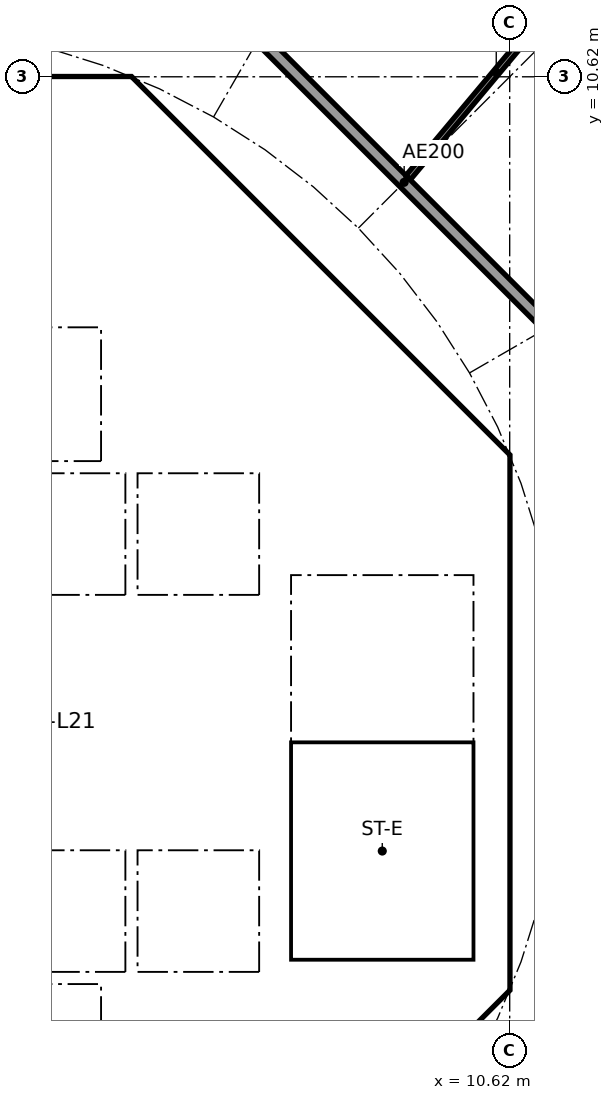
"""IFC4 building model, lengths in metres.
Left out: names, types, materials, properties, quantities, classifications, styles, units other than length and angle.
Written with IfcOpenShell. Run it as: python <this file> out.ifc"""

import sys

from ifc_helpers import new_model, si_unit, direction, frame, frame_2d, origin, place, context, subcontext, project, spatial, polyline, rectangle, outline, extrude, element, fill, save


model = new_model("IFC4")
c1 = context("Model", 3, precision=1e-05, world=origin(), true_north=direction((0.0, 1.0)))
c2 = subcontext(c1, "Body", "Model", "MODEL_VIEW")
j1 = project(units=[si_unit("LENGTHUNIT", "METRE"), si_unit("PLANEANGLEUNIT", "RADIAN")], contexts=[c1])
p1 = place(None, origin())
s1 = spatial("IfcSite", under=j1, at=p1, CompositionType="ELEMENT")
p2 = place(p1, origin())
s2 = spatial("IfcBuilding", under=s1, at=p2, CompositionType="ELEMENT")
p3 = place(p2, frame((0.0, 0.0, 84.4)))
s3 = spatial("IfcBuildingStorey", under=s2, at=p3, CompositionType="ELEMENT", Elevation=84.4)
p4 = place(p3, frame((9.988, 4.613, 0.0), z_axis=(0.0, 0.0, 1.0), x_axis=(-0.707106781187, 0.707106781187, 0.0)))
e1 = element("IfcWall", 1, at=p4, inside=s3, PredefinedType="SHEAR", context=c2, shape_type="SweptSolid", body=[
    extrude(rectangle(XDim=7.602, YDim=0.6, at=frame_2d((3.801, 0.0))), origin(), (0.0, 0.0, 1.0), 3.44),
])
p5 = place(p4, frame((3.201, 0.0, 0.0)))
e2 = element("IfcOpeningElement", 2, at=p5, cuts=e1, PredefinedType="OPENING", context=c2, shape_type="SweptSolid", body=[
    extrude(rectangle(XDim=1.2, YDim=2.1, at=frame_2d((0.6, 1.05))), frame((0.0, 0.31, 0.0), z_axis=(0.0, -1.0, 0.0), x_axis=(1.0, 0.0, 0.0)), (0.0, 0.0, 1.0), 0.62),
])
p6 = place(p3, frame((4.613, -9.988, 0.0), z_axis=(0.0, 0.0, 1.0), x_axis=(0.707106781187, 0.707106781187, 0.0)))
e3 = element("IfcWall", 3, at=p6, inside=s3, PredefinedType="SHEAR", context=c2, shape_type="SweptSolid", body=[
    extrude(rectangle(XDim=7.602, YDim=0.6, at=frame_2d((3.801, 0.0))), origin(), (0.0, 0.0, 1.0), 3.44),
])
p7 = place(p6, frame((3.201, 0.0, 0.0)))
e4 = element("IfcOpeningElement", 4, at=p7, cuts=e3, PredefinedType="OPENING", context=c2, shape_type="SweptSolid", body=[
    extrude(rectangle(XDim=1.2, YDim=2.1, at=frame_2d((0.6, 1.05))), frame((0.0, 0.31, 0.0), z_axis=(0.0, -1.0, 0.0), x_axis=(1.0, 0.0, 0.0)), (0.0, 0.0, 1.0), 0.62),
])
p8 = place(p3, frame((4.0, 4.3, 0.0), z_axis=(0.0, 0.0, 1.0), x_axis=(0.0, 1.0, 0.0)))
e5 = element("IfcWall", 5, at=p8, inside=s3, PredefinedType="SOLIDWALL", context=c2, shape_type="SweptSolid", body=[
    extrude(rectangle(XDim=2.2, YDim=0.2, at=frame_2d((1.1, 0.0))), origin(), (0.0, 0.0, 1.0), 3.44),
])
p9 = place(p8, frame((0.55, 0.0, 0.0)))
e6 = element("IfcOpeningElement", 6, at=p9, cuts=e5, PredefinedType="OPENING", context=c2, shape_type="SweptSolid", body=[
    extrude(rectangle(XDim=1.1, YDim=2.1, at=frame_2d((0.55, 1.05))), frame((0.0, 0.11, 0.0), z_axis=(0.0, -1.0, 0.0), x_axis=(1.0, 0.0, 0.0)), (0.0, 0.0, 1.0), 0.22),
])
p10 = place(p3, frame((-6.7, 2.0, 0.0), z_axis=(0.0, 0.0, 1.0), x_axis=(1.0, 0.0, 0.0)))
e7 = element("IfcWall", 7, at=p10, inside=s3, PredefinedType="SOLIDWALL", context=c2, shape_type="SweptSolid", body=[
    extrude(rectangle(XDim=13.4, YDim=0.2, at=frame_2d((6.7, 0.0))), origin(), (0.0, 0.0, 1.0), 3.44),
])
p11 = place(p10, frame((0.65, 0.0, 0.0)))
e8 = element("IfcOpeningElement", 8, at=p11, cuts=e7, PredefinedType="OPENING", context=c2, shape_type="SweptSolid", body=[
    extrude(rectangle(XDim=1.1, YDim=2.1, at=frame_2d((0.55, 1.05))), frame((0.0, 0.11, 0.0), z_axis=(0.0, -1.0, 0.0), x_axis=(1.0, 0.0, 0.0)), (0.0, 0.0, 1.0), 0.22),
])
p12 = place(p10, frame((2.85, 0.0, 0.0)))
e9 = element("IfcOpeningElement", 9, at=p12, cuts=e7, PredefinedType="OPENING", context=c2, shape_type="SweptSolid", body=[
    extrude(rectangle(XDim=1.1, YDim=2.1, at=frame_2d((0.55, 1.05))), frame((0.0, 0.11, 0.0), z_axis=(0.0, -1.0, 0.0), x_axis=(1.0, 0.0, 0.0)), (0.0, 0.0, 1.0), 0.22),
])
p13 = place(p10, frame((5.05, 0.0, 0.0)))
e10 = element("IfcOpeningElement", 10, at=p13, cuts=e7, PredefinedType="OPENING", context=c2, shape_type="SweptSolid", body=[
    extrude(rectangle(XDim=1.1, YDim=2.1, at=frame_2d((0.55, 1.05))), frame((0.0, 0.11, 0.0), z_axis=(0.0, -1.0, 0.0), x_axis=(1.0, 0.0, 0.0)), (0.0, 0.0, 1.0), 0.22),
])
p14 = place(p3, frame((6.7, 4.0, 0.0), z_axis=(0.0, 0.0, 1.0), x_axis=(1.0, 0.0, 0.0)))
e11 = element("IfcWall", 11, at=p14, inside=s3, PredefinedType="SOLIDWALL", context=c2, shape_type="SweptSolid", body=[
    extrude(rectangle(XDim=3.325, YDim=0.2, at=frame_2d((1.662, 0.0))), origin(), (0.0, 0.0, 1.0), 3.44),
])
p15 = place(p14, frame((1.25, 0.0, 0.0)))
e12 = element("IfcOpeningElement", 12, at=p15, cuts=e11, PredefinedType="OPENING", context=c2, shape_type="SweptSolid", body=[
    extrude(rectangle(XDim=1.1, YDim=2.1, at=frame_2d((0.55, 1.05))), frame((0.0, 0.11, 0.0), z_axis=(0.0, -1.0, 0.0), x_axis=(1.0, 0.0, 0.0)), (0.0, 0.0, 1.0), 0.22),
])
p16 = place(p3, frame((4.0, 7.025, 0.0), z_axis=(0.0, 0.0, 1.0), x_axis=(0.0, 1.0, 0.0)))
e13 = element("IfcWall", 13, at=p16, inside=s3, PredefinedType="SOLIDWALL", context=c2, shape_type="SweptSolid", body=[
    extrude(rectangle(XDim=3.0, YDim=0.2, at=frame_2d((1.5, 0.0))), origin(), (0.0, 0.0, 1.0), 3.44),
])
p17 = place(p16, frame((0.925, 0.0, 0.0)))
e14 = element("IfcOpeningElement", 14, at=p17, cuts=e13, PredefinedType="OPENING", context=c2, shape_type="SweptSolid", body=[
    extrude(rectangle(XDim=1.1, YDim=2.1, at=frame_2d((0.55, 1.05))), frame((0.0, 0.11, 0.0), z_axis=(0.0, -1.0, 0.0), x_axis=(1.0, 0.0, 0.0)), (0.0, 0.0, 1.0), 0.22),
])
p18 = place(p3, frame((4.0, -6.5, 0.0), z_axis=(0.0, 0.0, 1.0), x_axis=(0.0, 1.0, 0.0)))
e15 = element("IfcWall", 15, at=p18, inside=s3, PredefinedType="SOLIDWALL", context=c2, shape_type="SweptSolid", body=[
    extrude(rectangle(XDim=2.2, YDim=0.2, at=frame_2d((1.1, 0.0))), origin(), (0.0, 0.0, 1.0), 3.44),
])
p19 = place(p18, frame((0.55, 0.0, 0.0)))
e16 = element("IfcOpeningElement", 16, at=p19, cuts=e15, PredefinedType="OPENING", context=c2, shape_type="SweptSolid", body=[
    extrude(rectangle(XDim=1.1, YDim=2.1, at=frame_2d((0.55, 1.05))), frame((0.0, 0.11, 0.0), z_axis=(0.0, -1.0, 0.0), x_axis=(1.0, 0.0, 0.0)), (0.0, 0.0, 1.0), 0.22),
])
p20 = place(p3, frame((-6.7, -2.0, 0.0), z_axis=(0.0, 0.0, 1.0), x_axis=(1.0, 0.0, 0.0)))
e17 = element("IfcWall", 17, at=p20, inside=s3, PredefinedType="SOLIDWALL", context=c2, shape_type="SweptSolid", body=[
    extrude(rectangle(XDim=13.4, YDim=0.2, at=frame_2d((6.7, 0.0))), origin(), (0.0, 0.0, 1.0), 3.44),
])
p21 = place(p20, frame((0.65, 0.0, 0.0)))
e18 = element("IfcOpeningElement", 18, at=p21, cuts=e17, PredefinedType="OPENING", context=c2, shape_type="SweptSolid", body=[
    extrude(rectangle(XDim=1.1, YDim=2.1, at=frame_2d((0.55, 1.05))), frame((0.0, 0.11, 0.0), z_axis=(0.0, -1.0, 0.0), x_axis=(1.0, 0.0, 0.0)), (0.0, 0.0, 1.0), 0.22),
])
p22 = place(p20, frame((2.85, 0.0, 0.0)))
e19 = element("IfcOpeningElement", 19, at=p22, cuts=e17, PredefinedType="OPENING", context=c2, shape_type="SweptSolid", body=[
    extrude(rectangle(XDim=1.1, YDim=2.1, at=frame_2d((0.55, 1.05))), frame((0.0, 0.11, 0.0), z_axis=(0.0, -1.0, 0.0), x_axis=(1.0, 0.0, 0.0)), (0.0, 0.0, 1.0), 0.22),
])
p23 = place(p3, origin())
e20 = element("IfcWall", 20, at=p23, inside=s3, PredefinedType="SHEAR", context=c2, shape_type="SweptSolid", body=[
    extrude(outline(polyline([(-4.152, 10.025), (-4.401, 9.776), (-4.825, 10.2), (-4.401, 10.625), (4.401, 10.625), (4.825, 10.2), (4.401, 9.776), (4.152, 10.025), (-4.152, 10.025)])), origin(), (0.0, 0.0, 1.0), 3.44),
])
p24 = place(p3, origin())
e21 = element("IfcWall", 21, at=p24, inside=s3, PredefinedType="SHEAR", context=c2, shape_type="SweptSolid", body=[
    extrude(outline(polyline([(9.776, -4.401), (10.025, -4.152), (10.025, -3.801), (10.025, 4.152), (9.776, 4.401), (10.2, 4.825), (10.625, 4.401), (10.625, -4.401), (10.2, -4.825), (9.776, -4.401)])), origin(), (0.0, 0.0, 1.0), 3.44),
])
p25 = place(p3, origin())
e22 = element("IfcWall", 22, at=p25, inside=s3, PredefinedType="SOLIDWALL", context=c2, shape_type="SweptSolid", body=[
    extrude(outline(polyline([(-6.7, -2.1), (-6.5, -2.1), (-6.5, -4.1), (-4.5, -4.1), (-4.5, -2.1), (-4.3, -2.1), (-4.3, -4.1), (-2.3, -4.1), (-2.3, -2.1), (-2.1, -2.1), (-2.1, -4.1), (-0.1, -4.1), (-0.1, -2.1), (0.1, -2.1), (0.1, -4.1), (2.1, -4.1), (2.1, -2.1), (2.3, -2.1), (2.3, -4.1), (4.3, -4.1), (4.3, -2.1), (4.5, -2.1), (4.5, -4.1), (6.5, -4.1), (6.5, -2.1), (6.7, -2.1), (6.7, -4.3), (-6.7, -4.3), (-6.7, -2.1)])), origin(), (0.0, 0.0, 1.0), 3.44),
])
p26 = place(p3, origin())
e23 = element("IfcWall", 23, at=p26, inside=s3, PredefinedType="SOLIDWALL", context=c2, shape_type="SweptSolid", body=[
    extrude(outline(polyline([(-6.5, 2.1), (-6.7, 2.1), (-6.7, 4.3), (6.7, 4.3), (6.7, 2.1), (6.5, 2.1), (6.5, 4.1), (4.5, 4.1), (4.5, 2.1), (4.3, 2.1), (4.3, 4.1), (2.3, 4.1), (2.3, 2.1), (2.1, 2.1), (2.1, 4.1), (0.1, 4.1), (0.1, 2.1), (-0.1, 2.1), (-0.1, 4.1), (-2.1, 4.1), (-2.1, 2.1), (-2.3, 2.1), (-2.3, 4.1), (-4.3, 4.1), (-4.3, 2.1), (-4.5, 2.1), (-4.5, 4.1), (-6.5, 4.1), (-6.5, 2.1)])), origin(), (0.0, 0.0, 1.0), 3.44),
])
p27 = place(p3, origin())
e24 = element("IfcWall", 24, at=p27, inside=s3, PredefinedType="SOLIDWALL", context=c2, shape_type="SweptSolid", body=[
    extrude(outline(polyline([(4.1, 6.5), (-4.1, 6.5), (-4.1, 7.025), (4.1, 7.025), (4.1, 6.5)])), origin(), (0.0, 0.0, 1.0), 3.44),
])
p28 = place(p3, origin())
e25 = element("IfcWall", 25, at=p28, inside=s3, PredefinedType="SOLIDWALL", context=c2, shape_type="SweptSolid", body=[
    extrude(outline(polyline([(7.025, -3.9), (6.7, -3.9), (6.7, 3.9), (7.025, 3.9), (7.025, -3.9)])), origin(), (0.0, 0.0, 1.0), 3.44),
])
p29 = place(p3, origin())
e26 = element("IfcWall", 26, at=p29, inside=s3, PredefinedType="SOLIDWALL", context=c2, shape_type="SweptSolid", body=[
    extrude(outline(polyline([(10.025, -4.1), (6.7, -4.1), (6.7, -3.9), (10.025, -3.9), (10.025, -4.1)])), origin(), (0.0, 0.0, 1.0), 3.44),
])
p30 = place(p3, frame((12.635, 5.134, 0.0), z_axis=(0.0, 0.0, 1.0), x_axis=(-0.707106781187, 0.707106781187, 0.0)))
e27 = element("IfcWall", 27, at=p30, inside=s3, PredefinedType="PARTITIONING", context=c2, shape_type="SweptSolid", body=[
    extrude(rectangle(XDim=10.609, YDim=0.2, at=frame_2d((5.305, 0.0))), origin(), (0.0, 0.0, 1.0), 3.44),
])
p31 = place(p3, frame((13.339, 10.725, 0.0), z_axis=(0.0, 0.0, 1.0), x_axis=(-0.642515455924, 0.766272724882, 0.0)))
e28 = element("IfcWall", 28, at=p31, inside=s3, PredefinedType="PARTITIONING", context=c2, shape_type="SweptSolid", body=[
    extrude(rectangle(XDim=4.537, YDim=0.1, at=frame_2d((2.269, 0.0))), origin(), (0.0, 0.0, 1.0), 2.762),
])
p32 = place(p3, frame((8.949, 8.961, 0.0), z_axis=(0.0, 0.0, 1.0), x_axis=(0.642048217601, 0.766664259162, 0.0)))
e29 = element("IfcWall", 29, at=p32, inside=s3, PredefinedType="PARTITIONING", context=c2, shape_type="SweptSolid", body=[
    extrude(rectangle(XDim=4.518, YDim=0.1, at=frame_2d((2.259, 0.0))), origin(), (0.0, 0.0, 1.0), 2.687),
])
p33 = place(p9, origin())
e30 = element("IfcDoor", 30, at=p33, inside=s3, OperationType="DOUBLE_DOOR_SLIDING", PredefinedType="DOOR", context=c2, shape_type="SweptSolid", body=[
    extrude(rectangle(XDim=1.1, YDim=2.1, at=frame_2d((0.55, 1.05))), frame((0.0, 0.025, 0.0), z_axis=(0.0, -1.0, 0.0), x_axis=(1.0, 0.0, 0.0)), (0.0, 0.0, 1.0), 0.05),
])
fill(e6, e30)
p34 = place(p19, origin())
e31 = element("IfcDoor", 31, at=p34, inside=s3, OperationType="DOUBLE_DOOR_SLIDING", PredefinedType="DOOR", context=c2, shape_type="SweptSolid", body=[
    extrude(rectangle(XDim=1.1, YDim=2.1, at=frame_2d((0.55, 1.05))), frame((0.0, 0.025, 0.0), z_axis=(0.0, -1.0, 0.0), x_axis=(1.0, 0.0, 0.0)), (0.0, 0.0, 1.0), 0.05),
])
fill(e16, e31)
p35 = place(p15, frame((1.1, 0.0, 0.0), x_axis=(-1.0, 0.0, 0.0)))
e32 = element("IfcDoor", 32, at=p35, inside=s3, OperationType="SINGLE_SWING_LEFT", PredefinedType="DOOR", context=c2, shape_type="SweptSolid", body=[
    extrude(rectangle(XDim=1.1, YDim=2.1, at=frame_2d((0.55, 1.05))), frame((0.0, 0.025, 0.0), z_axis=(0.0, -1.0, 0.0), x_axis=(1.0, 0.0, 0.0)), (0.0, 0.0, 1.0), 0.05),
])
fill(e12, e32)
p36 = place(p17, origin())
e33 = element("IfcDoor", 33, at=p36, inside=s3, OperationType="SINGLE_SWING_RIGHT", PredefinedType="DOOR", context=c2, shape_type="SweptSolid", body=[
    extrude(rectangle(XDim=1.1, YDim=2.1, at=frame_2d((0.55, 1.05))), frame((0.0, 0.025, 0.0), z_axis=(0.0, -1.0, 0.0), x_axis=(1.0, 0.0, 0.0)), (0.0, 0.0, 1.0), 0.05),
])
fill(e14, e33)
p37 = place(p5, origin())
e34 = element("IfcDoor", 34, at=p37, inside=s3, OperationType="SINGLE_SWING_LEFT", PredefinedType="DOOR", context=c2, shape_type="SweptSolid", body=[
    extrude(rectangle(XDim=1.2, YDim=2.1, at=frame_2d((0.6, 1.05))), frame((0.0, 0.025, 0.0), z_axis=(0.0, -1.0, 0.0), x_axis=(1.0, 0.0, 0.0)), (0.0, 0.0, 1.0), 0.05),
])
fill(e2, e34)
save(model, sys.argv[1])
